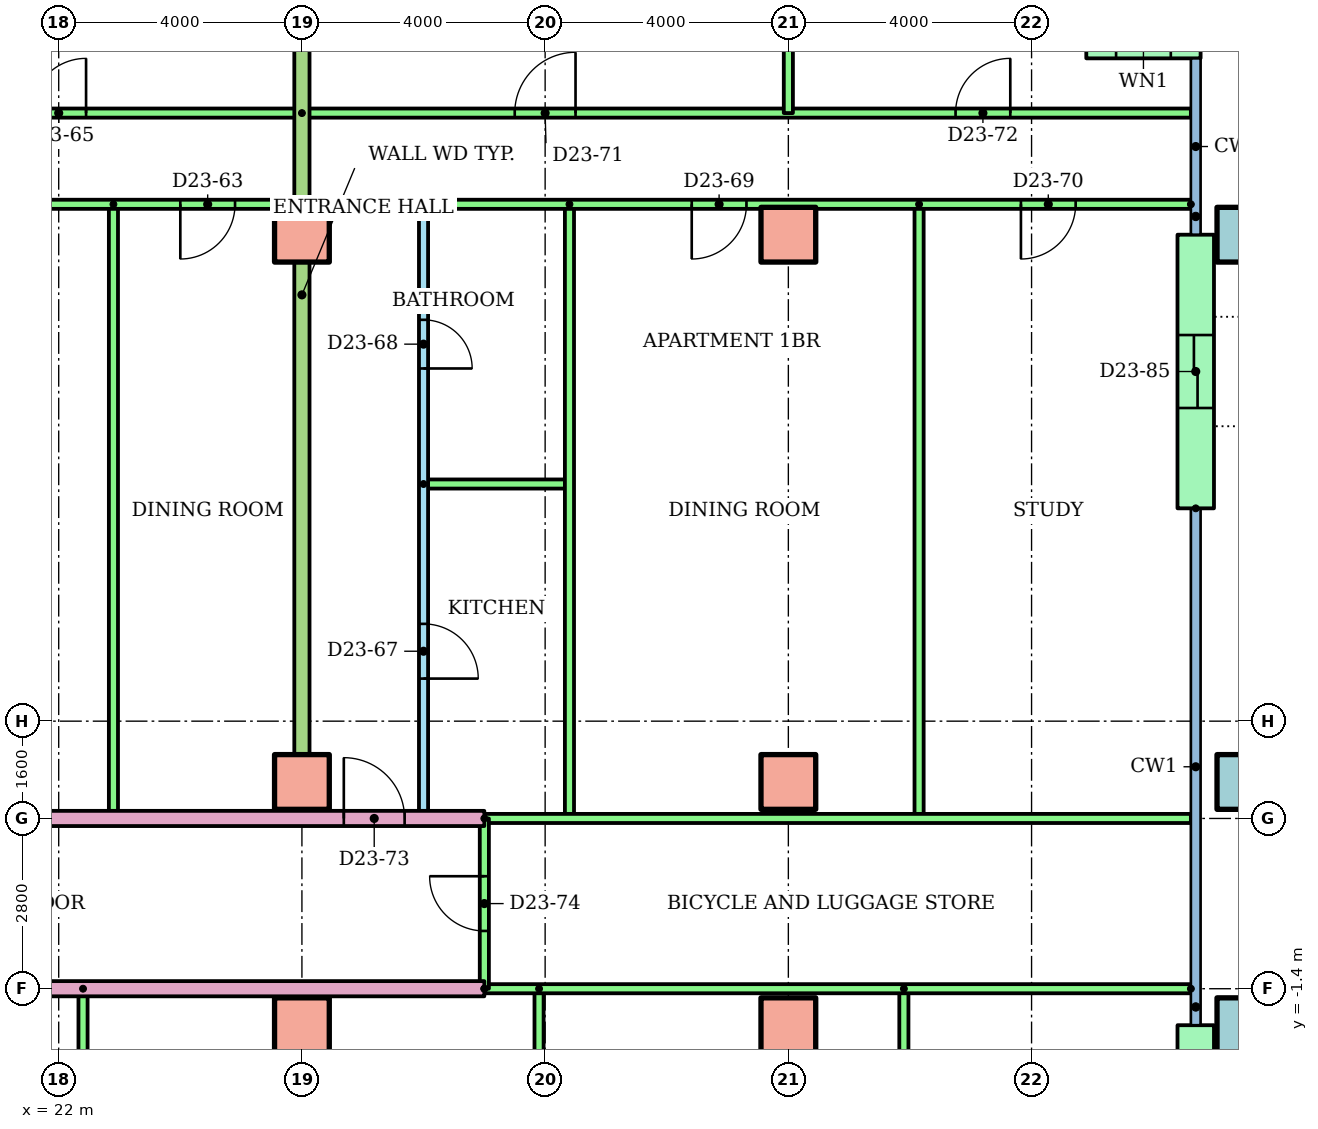
"""IFC4 building model, lengths in metres.
Left out: names, types, materials, properties, quantities, classifications, styles, units other than length and angle.
Written with IfcOpenShell. Run it as: python <this file> out.ifc"""

import sys

from ifc_helpers import new_model, si_unit, direction, frame, frame_2d, origin, origin_2d, place, context, subcontext, project, spatial, rectangle, hollow_rectangle, extrude, element, fill, save


model = new_model("IFC4")
c1 = context("Model", 3, precision=1e-05, world=origin(), true_north=direction((0.0, 1.0)))
c2 = subcontext(c1, "Body", "Model", "MODEL_VIEW")
j1 = project(units=[si_unit("LENGTHUNIT", "METRE"), si_unit("PLANEANGLEUNIT", "RADIAN")], contexts=[c1])
p1 = place(None, origin())
s1 = spatial("IfcSite", under=j1, at=p1, CompositionType="ELEMENT")
p2 = place(p1, origin())
s2 = spatial("IfcBuilding", under=s1, at=p2, CompositionType="ELEMENT")
p3 = place(p2, frame((0.0, 0.0, 90.3)))
s3 = spatial("IfcBuildingStorey", under=s2, at=p3, CompositionType="ELEMENT", Elevation=90.3)
for number, where in (
    (1, (26.0, -2.0, 0.0)),
    (2, (34.0, -2.0, 0.0)),
):
    element("IfcColumn", number, at=place(p3, frame(where)), inside=s3, PredefinedType="COLUMN", context=c2, shape_type="SweptSolid", body=[
        extrude(rectangle(XDim=0.9, YDim=0.9, at=origin_2d()), origin(), (0.0, 0.0, 1.0), 3.2),
    ])
p4 = place(p3, frame((41.5, -2.0, 0.0)))
e3 = element("IfcColumn", 3, at=p4, inside=s3, PredefinedType="COLUMN", context=c2, shape_type="SweptSolid", body=[
    extrude(hollow_rectangle(XDim=0.9, YDim=0.9, WallThickness=0.045, at=origin_2d()), origin(), (0.0, 0.0, 1.0), 3.2),
])
for number, where in (
    (4, (26.0, 2.0, 0.0)),
    (5, (34.0, 2.0, 0.0)),
):
    element("IfcColumn", number, at=place(p3, frame(where)), inside=s3, PredefinedType="COLUMN", context=c2, shape_type="SweptSolid", body=[
        extrude(rectangle(XDim=0.9, YDim=0.9, at=origin_2d()), origin(), (0.0, 0.0, 1.0), 3.2),
    ])
p5 = place(p3, frame((41.5, 2.0, 0.0)))
e6 = element("IfcColumn", 6, at=p5, inside=s3, PredefinedType="COLUMN", context=c2, shape_type="SweptSolid", body=[
    extrude(hollow_rectangle(XDim=0.9, YDim=0.9, WallThickness=0.045, at=origin_2d()), origin(), (0.0, 0.0, 1.0), 3.2),
])
for number, where in (
    (7, (26.0, 11.0, 0.0)),
    (8, (34.0, 11.0, 0.0)),
):
    element("IfcColumn", number, at=place(p3, frame(where)), inside=s3, PredefinedType="COLUMN", context=c2, shape_type="SweptSolid", body=[
        extrude(rectangle(XDim=0.9, YDim=0.9, at=origin_2d()), origin(), (0.0, 0.0, 1.0), 3.2),
    ])
p6 = place(p3, frame((41.5, 11.0, 0.0)))
e9 = element("IfcColumn", 9, at=p6, inside=s3, PredefinedType="COLUMN", context=c2, shape_type="SweptSolid", body=[
    extrude(hollow_rectangle(XDim=0.9, YDim=0.9, WallThickness=0.045, at=origin_2d()), origin(), (0.0, 0.0, 1.0), 3.2),
])
p7 = place(p3, frame((40.78, 14.2, 0.0), z_axis=(0.0, 0.0, 1.0), x_axis=(-1.0, 0.0, 0.0)))
e10 = element("IfcWall", 10, at=p7, inside=s3, PredefinedType="STANDARD", context=c2, shape_type="SweptSolid", body=[
    extrude(rectangle(XDim=1.88, YDim=0.6, at=frame_2d((0.94, 0.0))), origin(), (0.0, 0.0, 1.0), 2.92),
])
p8 = place(p7, frame((0.49, 0.0, 0.9)))
e11 = element("IfcOpeningElement", 11, at=p8, cuts=e10, PredefinedType="OPENING", context=c2, shape_type="SweptSolid", body=[
    extrude(rectangle(XDim=0.9, YDim=1.5, at=frame_2d((0.45, 0.75))), frame((0.0, 0.31, 0.0), z_axis=(0.0, -1.0, 0.0), x_axis=(1.0, 0.0, 0.0)), (0.0, 0.0, 1.0), 0.62),
])
p9 = place(p3, frame((40.7, -5.7, 0.0), z_axis=(0.0, 0.0, 1.0), x_axis=(0.0, 1.0, 0.0)))
e12 = element("IfcWall", 12, at=p9, inside=s3, PredefinedType="STANDARD", context=c2, shape_type="SweptSolid", body=[
    extrude(rectangle(XDim=3.7, YDim=0.6, at=frame_2d((1.85, 0.0))), origin(), (0.0, 0.0, 1.0), 2.92),
])
p10 = place(p9, frame((1.25, 0.0, 0.0)))
e13 = element("IfcOpeningElement", 13, at=p10, cuts=e12, PredefinedType="OPENING", context=c2, shape_type="SweptSolid", body=[
    extrude(rectangle(XDim=1.2, YDim=2.1, at=frame_2d((0.6, 1.05))), frame((0.0, 0.31, 0.0), z_axis=(0.0, -1.0, 0.0), x_axis=(1.0, 0.0, 0.0)), (0.0, 0.0, 1.0), 0.62),
])
p11 = place(p3, frame((40.7, 6.5, 0.0), z_axis=(0.0, 0.0, 1.0), x_axis=(0.0, 1.0, 0.0)))
e14 = element("IfcWall", 14, at=p11, inside=s3, PredefinedType="STANDARD", context=c2, shape_type="SweptSolid", body=[
    extrude(rectangle(XDim=4.5, YDim=0.6, at=frame_2d((2.25, 0.0))), origin(), (0.0, 0.0, 1.0), 2.92),
])
p12 = place(p11, frame((1.65, 0.0, 0.0)))
e15 = element("IfcOpeningElement", 15, at=p12, cuts=e14, PredefinedType="OPENING", context=c2, shape_type="SweptSolid", body=[
    extrude(rectangle(XDim=1.2, YDim=2.1, at=frame_2d((0.6, 1.05))), frame((0.0, 0.31, 0.0), z_axis=(0.0, -1.0, 0.0), x_axis=(1.0, 0.0, 0.0)), (0.0, 0.0, 1.0), 0.62),
])
for number, where, z_axis, x_axis in (
    (16, (22.4, -1.4, 0.0), (0.0, 0.0, 1.0), (0.0, -1.0, 0.0)),
    (17, (29.9, -1.4, 0.0), (0.0, 0.0, 1.0), (0.0, -1.0, 0.0)),
    (18, (35.9, -1.4, 0.0), (0.0, 0.0, 1.0), (0.0, -1.0, 0.0)),
):
    element("IfcWall", number, at=place(p3, frame(where, z_axis=z_axis, x_axis=x_axis)), inside=s3, PredefinedType="PARTITIONING", context=c2, shape_type="SweptSolid", body=[
        extrude(rectangle(XDim=7.7, YDim=0.15, at=frame_2d((3.85, 0.0))), origin(), (0.0, 0.0, 1.0), 2.4),
    ])
p13 = place(p3, frame((29.0, -1.4, 0.0), z_axis=(0.0, 0.0, 1.0), x_axis=(-1.0, 0.0, 0.0)))
e19 = element("IfcWall", 19, at=p13, inside=s3, PredefinedType="PARTITIONING", context=c2, shape_type="SweptSolid", body=[
    extrude(rectangle(XDim=15.0, YDim=0.25, at=frame_2d((7.5, 0.0))), origin(), (0.0, 0.0, 1.0), 2.4),
])
p14 = place(p13, frame((9.311, 0.0, 0.0)))
e20 = element("IfcOpeningElement", 20, at=p14, cuts=e19, PredefinedType="OPENING", context=c2, shape_type="SweptSolid", body=[
    extrude(rectangle(XDim=1.0, YDim=2.1, at=frame_2d((0.5, 1.05))), frame((0.0, 0.135, 0.0), z_axis=(0.0, -1.0, 0.0), x_axis=(1.0, 0.0, 0.0)), (0.0, 0.0, 1.0), 0.27),
])
p15 = place(p3, frame((40.62, -1.4, 0.0), z_axis=(0.0, 0.0, 1.0), x_axis=(-1.0, 0.0, 0.0)))
e21 = element("IfcWall", 21, at=p15, inside=s3, PredefinedType="PARTITIONING", context=c2, shape_type="SweptSolid", body=[
    extrude(rectangle(XDim=11.62, YDim=0.15, at=frame_2d((5.81, 0.0))), origin(), (0.0, 0.0, 1.0), 2.4),
])
p16 = place(p3, frame((22.9, 11.5, 0.0), z_axis=(0.0, 0.0, 1.0), x_axis=(0.0, -1.0, 0.0)))
e22 = element("IfcWall", 22, at=p16, inside=s3, PredefinedType="PARTITIONING", context=c2, shape_type="SweptSolid", body=[
    extrude(rectangle(XDim=10.1, YDim=0.15, at=frame_2d((5.05, 0.0))), origin(), (0.0, 0.0, 1.0), 2.4),
])
p17 = place(p3, frame((26.0, 11.5, 0.0), z_axis=(0.0, 0.0, 1.0), x_axis=(-1.0, 0.0, 0.0)))
e23 = element("IfcWall", 23, at=p17, inside=s3, PredefinedType="PARTITIONING", context=c2, shape_type="SweptSolid", body=[
    extrude(rectangle(XDim=10.0, YDim=0.15, at=frame_2d((5.0, 0.0))), origin(), (0.0, 0.0, 1.0), 2.4),
])
p18 = place(p17, frame((4.9, 0.0, 0.0)))
e24 = element("IfcOpeningElement", 24, at=p18, cuts=e23, PredefinedType="OPENING", context=c2, shape_type="SweptSolid", body=[
    extrude(rectangle(XDim=0.9, YDim=2.1, at=frame_2d((0.45, 1.05))), frame((0.0, 0.085, 0.0), z_axis=(0.0, -1.0, 0.0), x_axis=(1.0, 0.0, 0.0)), (0.0, 0.0, 1.0), 0.17),
])
p19 = place(p17, frame((1.1, 0.0, 0.0)))
e25 = element("IfcOpeningElement", 25, at=p19, cuts=e23, PredefinedType="OPENING", context=c2, shape_type="SweptSolid", body=[
    extrude(rectangle(XDim=0.9, YDim=2.1, at=frame_2d((0.45, 1.05))), frame((0.0, 0.085, 0.0), z_axis=(0.0, -1.0, 0.0), x_axis=(1.0, 0.0, 0.0)), (0.0, 0.0, 1.0), 0.17),
])
p20 = place(p3, frame((14.0, 13.0, 0.0)))
e26 = element("IfcWall", 26, at=p20, inside=s3, PredefinedType="PARTITIONING", context=c2, shape_type="SweptSolid", body=[
    extrude(rectangle(XDim=12.0, YDim=0.15, at=frame_2d((6.0, 0.0))), origin(), (0.0, 0.0, 1.0), 2.4),
])
p21 = place(p20, frame((1.5, 0.0, 0.0)))
e27 = element("IfcOpeningElement", 27, at=p21, cuts=e26, PredefinedType="OPENING", context=c2, shape_type="SweptSolid", body=[
    extrude(rectangle(XDim=1.0, YDim=2.1, at=frame_2d((0.5, 1.05))), frame((0.0, 0.085, 0.0), z_axis=(0.0, -1.0, 0.0), x_axis=(1.0, 0.0, 0.0)), (0.0, 0.0, 1.0), 0.17),
])
p22 = place(p20, frame((7.55, 0.0, 0.0)))
e28 = element("IfcOpeningElement", 28, at=p22, cuts=e26, PredefinedType="OPENING", context=c2, shape_type="SweptSolid", body=[
    extrude(rectangle(XDim=0.9, YDim=2.1, at=frame_2d((0.45, 1.05))), frame((0.0, 0.085, 0.0), z_axis=(0.0, -1.0, 0.0), x_axis=(1.0, 0.0, 0.0)), (0.0, 0.0, 1.0), 0.17),
])
p23 = place(p3, frame((28.0, 11.5, 0.0), z_axis=(0.0, 0.0, 1.0), x_axis=(0.0, -1.0, 0.0)))
e29 = element("IfcWall", 29, at=p23, inside=s3, PredefinedType="PARTITIONING", context=c2, shape_type="SweptSolid", body=[
    extrude(rectangle(XDim=10.1, YDim=0.15, at=frame_2d((5.05, 0.0))), origin(), (0.0, 0.0, 1.0), 2.4),
])
p24 = place(p23, frame((6.9, 0.0, 0.0)))
e30 = element("IfcOpeningElement", 30, at=p24, cuts=e29, PredefinedType="OPENING", context=c2, shape_type="SweptSolid", body=[
    extrude(rectangle(XDim=0.9, YDim=2.1, at=frame_2d((0.45, 1.05))), frame((0.0, 0.085, 0.0), z_axis=(0.0, -1.0, 0.0), x_axis=(1.0, 0.0, 0.0)), (0.0, 0.0, 1.0), 0.17),
])
p25 = place(p23, frame((1.9, 0.0, 0.0)))
e31 = element("IfcOpeningElement", 31, at=p25, cuts=e29, PredefinedType="OPENING", context=c2, shape_type="SweptSolid", body=[
    extrude(rectangle(XDim=0.8, YDim=2.1, at=frame_2d((0.4, 1.05))), frame((0.0, 0.085, 0.0), z_axis=(0.0, -1.0, 0.0), x_axis=(1.0, 0.0, 0.0)), (0.0, 0.0, 1.0), 0.17),
])
p26 = place(p3, frame((28.0, 6.9, 0.0)))
e32 = element("IfcWall", 32, at=p26, inside=s3, PredefinedType="PARTITIONING", context=c2, shape_type="SweptSolid", body=[
    extrude(rectangle(XDim=2.4, YDim=0.15, at=frame_2d((1.2, 0.0))), origin(), (0.0, 0.0, 1.0), 2.4),
])
for number, where, z_axis, x_axis in (
    (33, (30.4, 11.5, 0.0), (0.0, 0.0, 1.0), (0.0, -1.0, 0.0)),
    (34, (36.15, 11.5, 0.0), (0.0, 0.0, 1.0), (0.0, -1.0, 0.0)),
):
    element("IfcWall", number, at=place(p3, frame(where, z_axis=z_axis, x_axis=x_axis)), inside=s3, PredefinedType="PARTITIONING", context=c2, shape_type="SweptSolid", body=[
        extrude(rectangle(XDim=10.1, YDim=0.15, at=frame_2d((5.05, 0.0))), origin(), (0.0, 0.0, 1.0), 2.4),
    ])
p27 = place(p3, frame((40.62, 11.5, 0.0), z_axis=(0.0, 0.0, 1.0), x_axis=(-1.0, 0.0, 0.0)))
e35 = element("IfcWall", 35, at=p27, inside=s3, PredefinedType="PARTITIONING", context=c2, shape_type="SweptSolid", body=[
    extrude(rectangle(XDim=12.62, YDim=0.15, at=frame_2d((6.31, 0.0))), origin(), (0.0, 0.0, 1.0), 2.4),
])
p28 = place(p27, frame((7.309, 0.0, 0.0)))
e36 = element("IfcOpeningElement", 36, at=p28, cuts=e35, PredefinedType="OPENING", context=c2, shape_type="SweptSolid", body=[
    extrude(rectangle(XDim=0.9, YDim=2.1, at=frame_2d((0.45, 1.05))), frame((0.0, 0.085, 0.0), z_axis=(0.0, -1.0, 0.0), x_axis=(1.0, 0.0, 0.0)), (0.0, 0.0, 1.0), 0.17),
])
p29 = place(p27, frame((1.895, 0.0, 0.0)))
e37 = element("IfcOpeningElement", 37, at=p29, cuts=e35, PredefinedType="OPENING", context=c2, shape_type="SweptSolid", body=[
    extrude(rectangle(XDim=0.9, YDim=2.1, at=frame_2d((0.45, 1.05))), frame((0.0, 0.085, 0.0), z_axis=(0.0, -1.0, 0.0), x_axis=(1.0, 0.0, 0.0)), (0.0, 0.0, 1.0), 0.17),
])
p30 = place(p3, frame((26.0, 13.0, 0.0)))
e38 = element("IfcWall", 38, at=p30, inside=s3, PredefinedType="PARTITIONING", context=c2, shape_type="SweptSolid", body=[
    extrude(rectangle(XDim=14.62, YDim=0.15, at=frame_2d((7.31, 0.0))), origin(), (0.0, 0.0, 1.0), 2.4),
])
p31 = place(p30, frame((3.5, 0.0, 0.0)))
e39 = element("IfcOpeningElement", 39, at=p31, cuts=e38, PredefinedType="OPENING", context=c2, shape_type="SweptSolid", body=[
    extrude(rectangle(XDim=1.0, YDim=2.1, at=frame_2d((0.5, 1.05))), frame((0.0, 0.085, 0.0), z_axis=(0.0, -1.0, 0.0), x_axis=(1.0, 0.0, 0.0)), (0.0, 0.0, 1.0), 0.17),
])
p32 = place(p30, frame((10.75, 0.0, 0.0)))
e40 = element("IfcOpeningElement", 40, at=p32, cuts=e38, PredefinedType="OPENING", context=c2, shape_type="SweptSolid", body=[
    extrude(rectangle(XDim=0.9, YDim=2.1, at=frame_2d((0.45, 1.05))), frame((0.0, 0.085, 0.0), z_axis=(0.0, -1.0, 0.0), x_axis=(1.0, 0.0, 0.0)), (0.0, 0.0, 1.0), 0.17),
])
p33 = place(p3, frame((34.0, 18.621, 0.0), z_axis=(0.0, 0.0, 1.0), x_axis=(0.0, -1.0, 0.0)))
e41 = element("IfcWall", 41, at=p33, inside=s3, PredefinedType="PARTITIONING", context=c2, shape_type="SweptSolid", body=[
    extrude(rectangle(XDim=5.621, YDim=0.15, at=frame_2d((2.811, 0.0))), origin(), (0.0, 0.0, 1.0), 2.4),
])
p34 = place(p3, frame((26.0, 18.621, 0.0), z_axis=(0.0, 0.0, 1.0), x_axis=(0.0, -1.0, 0.0)))
e42 = element("IfcWall", 42, at=p34, inside=s3, PredefinedType="PARTITIONING", context=c2, shape_type="SweptSolid", body=[
    extrude(rectangle(XDim=17.221, YDim=0.25, at=frame_2d((8.611, 0.0))), origin(), (0.0, 0.0, 1.0), 2.4),
])
p35 = place(p3, frame((14.0, 1.4, 0.0)))
e43 = element("IfcWall", 43, at=p35, inside=s3, PredefinedType="PARTITIONING", context=c2, shape_type="SweptSolid", body=[
    extrude(rectangle(XDim=15.0, YDim=0.25, at=frame_2d((7.5, 0.0))), origin(), (0.0, 0.0, 1.0), 2.4),
])
p36 = place(p35, frame((0.5, 0.0, 0.0)))
e44 = element("IfcOpeningElement", 44, at=p36, cuts=e43, PredefinedType="OPENING", context=c2, shape_type="SweptSolid", body=[
    extrude(rectangle(XDim=1.0, YDim=2.1, at=frame_2d((0.5, 1.05))), frame((0.0, 0.135, 0.0), z_axis=(0.0, -1.0, 0.0), x_axis=(1.0, 0.0, 0.0)), (0.0, 0.0, 1.0), 0.27),
])
p37 = place(p35, frame((12.689, 0.0, 0.0)))
e45 = element("IfcOpeningElement", 45, at=p37, cuts=e43, PredefinedType="OPENING", context=c2, shape_type="SweptSolid", body=[
    extrude(rectangle(XDim=1.0, YDim=2.1, at=frame_2d((0.5, 1.05))), frame((0.0, 0.135, 0.0), z_axis=(0.0, -1.0, 0.0), x_axis=(1.0, 0.0, 0.0)), (0.0, 0.0, 1.0), 0.27),
])
p38 = place(p3, frame((29.0, 1.4, 0.0)))
e46 = element("IfcWall", 46, at=p38, inside=s3, PredefinedType="PARTITIONING", context=c2, shape_type="SweptSolid", body=[
    extrude(rectangle(XDim=11.62, YDim=0.15, at=frame_2d((5.81, 0.0))), origin(), (0.0, 0.0, 1.0), 2.4),
])
p39 = place(p3, frame((29.0, -1.4, 0.0), z_axis=(0.0, 0.0, 1.0), x_axis=(0.0, 1.0, 0.0)))
e47 = element("IfcWall", 47, at=p39, inside=s3, PredefinedType="PARTITIONING", context=c2, shape_type="SweptSolid", body=[
    extrude(rectangle(XDim=2.8, YDim=0.15, at=frame_2d((1.4, 0.0))), origin(), (0.0, 0.0, 1.0), 2.4),
])
p40 = place(p39, frame((0.95, 0.0, 0.0)))
e48 = element("IfcOpeningElement", 48, at=p40, cuts=e47, PredefinedType="OPENING", context=c2, shape_type="SweptSolid", body=[
    extrude(rectangle(XDim=0.9, YDim=2.1, at=frame_2d((0.45, 1.05))), frame((0.0, 0.085, 0.0), z_axis=(0.0, -1.0, 0.0), x_axis=(1.0, 0.0, 0.0)), (0.0, 0.0, 1.0), 0.17),
])
p41 = place(p19, origin())
e49 = element("IfcDoor", 49, at=p41, inside=s3, OperationType="SINGLE_SWING_RIGHT", PredefinedType="DOOR", context=c2, shape_type="SweptSolid", body=[
    extrude(rectangle(XDim=0.9, YDim=2.1, at=frame_2d((0.45, 1.05))), frame((0.0, 0.025, 0.0), z_axis=(0.0, -1.0, 0.0), x_axis=(1.0, 0.0, 0.0)), (0.0, 0.0, 1.0), 0.05),
])
fill(e25, e49)
p42 = place(p22, origin())
e50 = element("IfcDoor", 50, at=p42, inside=s3, OperationType="SINGLE_SWING_RIGHT", PredefinedType="DOOR", context=c2, shape_type="SweptSolid", body=[
    extrude(rectangle(XDim=0.9, YDim=2.1, at=frame_2d((0.45, 1.05))), frame((0.0, 0.025, 0.0), z_axis=(0.0, -1.0, 0.0), x_axis=(1.0, 0.0, 0.0)), (0.0, 0.0, 1.0), 0.05),
])
fill(e28, e50)
p43 = place(p24, origin())
e51 = element("IfcDoor", 51, at=p43, inside=s3, OperationType="SINGLE_SWING_RIGHT", PredefinedType="DOOR", context=c2, shape_type="SweptSolid", body=[
    extrude(rectangle(XDim=0.9, YDim=2.1, at=frame_2d((0.45, 1.05))), frame((0.0, 0.025, 0.0), z_axis=(0.0, -1.0, 0.0), x_axis=(1.0, 0.0, 0.0)), (0.0, 0.0, 1.0), 0.05),
])
fill(e30, e51)
p44 = place(p25, origin())
e52 = element("IfcDoor", 52, at=p44, inside=s3, OperationType="SINGLE_SWING_RIGHT", PredefinedType="DOOR", context=c2, shape_type="SweptSolid", body=[
    extrude(rectangle(XDim=0.8, YDim=2.1, at=frame_2d((0.4, 1.05))), frame((0.0, 0.025, 0.0), z_axis=(0.0, -1.0, 0.0), x_axis=(1.0, 0.0, 0.0)), (0.0, 0.0, 1.0), 0.05),
])
fill(e31, e52)
p45 = place(p28, origin())
e53 = element("IfcDoor", 53, at=p45, inside=s3, OperationType="SINGLE_SWING_RIGHT", PredefinedType="DOOR", context=c2, shape_type="SweptSolid", body=[
    extrude(rectangle(XDim=0.9, YDim=2.1, at=frame_2d((0.45, 1.05))), frame((0.0, 0.025, 0.0), z_axis=(0.0, -1.0, 0.0), x_axis=(1.0, 0.0, 0.0)), (0.0, 0.0, 1.0), 0.05),
])
fill(e36, e53)
p46 = place(p29, origin())
e54 = element("IfcDoor", 54, at=p46, inside=s3, OperationType="SINGLE_SWING_RIGHT", PredefinedType="DOOR", context=c2, shape_type="SweptSolid", body=[
    extrude(rectangle(XDim=0.9, YDim=2.1, at=frame_2d((0.45, 1.05))), frame((0.0, 0.025, 0.0), z_axis=(0.0, -1.0, 0.0), x_axis=(1.0, 0.0, 0.0)), (0.0, 0.0, 1.0), 0.05),
])
fill(e37, e54)
p47 = place(p31, origin())
e55 = element("IfcDoor", 55, at=p47, inside=s3, OperationType="SINGLE_SWING_RIGHT", PredefinedType="DOOR", context=c2, shape_type="SweptSolid", body=[
    extrude(rectangle(XDim=1.0, YDim=2.1, at=frame_2d((0.5, 1.05))), frame((0.0, 0.025, 0.0), z_axis=(0.0, -1.0, 0.0), x_axis=(1.0, 0.0, 0.0)), (0.0, 0.0, 1.0), 0.05),
])
fill(e39, e55)
p48 = place(p32, origin())
e56 = element("IfcDoor", 56, at=p48, inside=s3, OperationType="SINGLE_SWING_RIGHT", PredefinedType="DOOR", context=c2, shape_type="SweptSolid", body=[
    extrude(rectangle(XDim=0.9, YDim=2.1, at=frame_2d((0.45, 1.05))), frame((0.0, 0.025, 0.0), z_axis=(0.0, -1.0, 0.0), x_axis=(1.0, 0.0, 0.0)), (0.0, 0.0, 1.0), 0.05),
])
fill(e40, e56)
p49 = place(p37, origin())
e57 = element("IfcDoor", 57, at=p49, inside=s3, OperationType="SINGLE_SWING_LEFT", PredefinedType="DOOR", context=c2, shape_type="SweptSolid", body=[
    extrude(rectangle(XDim=1.0, YDim=2.1, at=frame_2d((0.5, 1.05))), frame((0.0, 0.025, 0.0), z_axis=(0.0, -1.0, 0.0), x_axis=(1.0, 0.0, 0.0)), (0.0, 0.0, 1.0), 0.05),
])
fill(e45, e57)
p50 = place(p40, origin())
e58 = element("IfcDoor", 58, at=p50, inside=s3, OperationType="SINGLE_SWING_RIGHT", PredefinedType="DOOR", context=c2, shape_type="SweptSolid", body=[
    extrude(rectangle(XDim=0.9, YDim=2.1, at=frame_2d((0.45, 1.05))), frame((0.0, 0.025, 0.0), z_axis=(0.0, -1.0, 0.0), x_axis=(1.0, 0.0, 0.0)), (0.0, 0.0, 1.0), 0.05),
])
fill(e48, e58)
p51 = place(p12, origin())
e59 = element("IfcDoor", 59, at=p51, inside=s3, OperationType="SLIDING_TO_LEFT", PredefinedType="DOOR", context=c2, shape_type="SweptSolid", body=[
    extrude(rectangle(XDim=1.2, YDim=2.1, at=frame_2d((0.6, 1.05))), frame((0.0, 0.025, 0.0), z_axis=(0.0, -1.0, 0.0), x_axis=(1.0, 0.0, 0.0)), (0.0, 0.0, 1.0), 0.05),
])
fill(e15, e59)
save(model, sys.argv[1])
